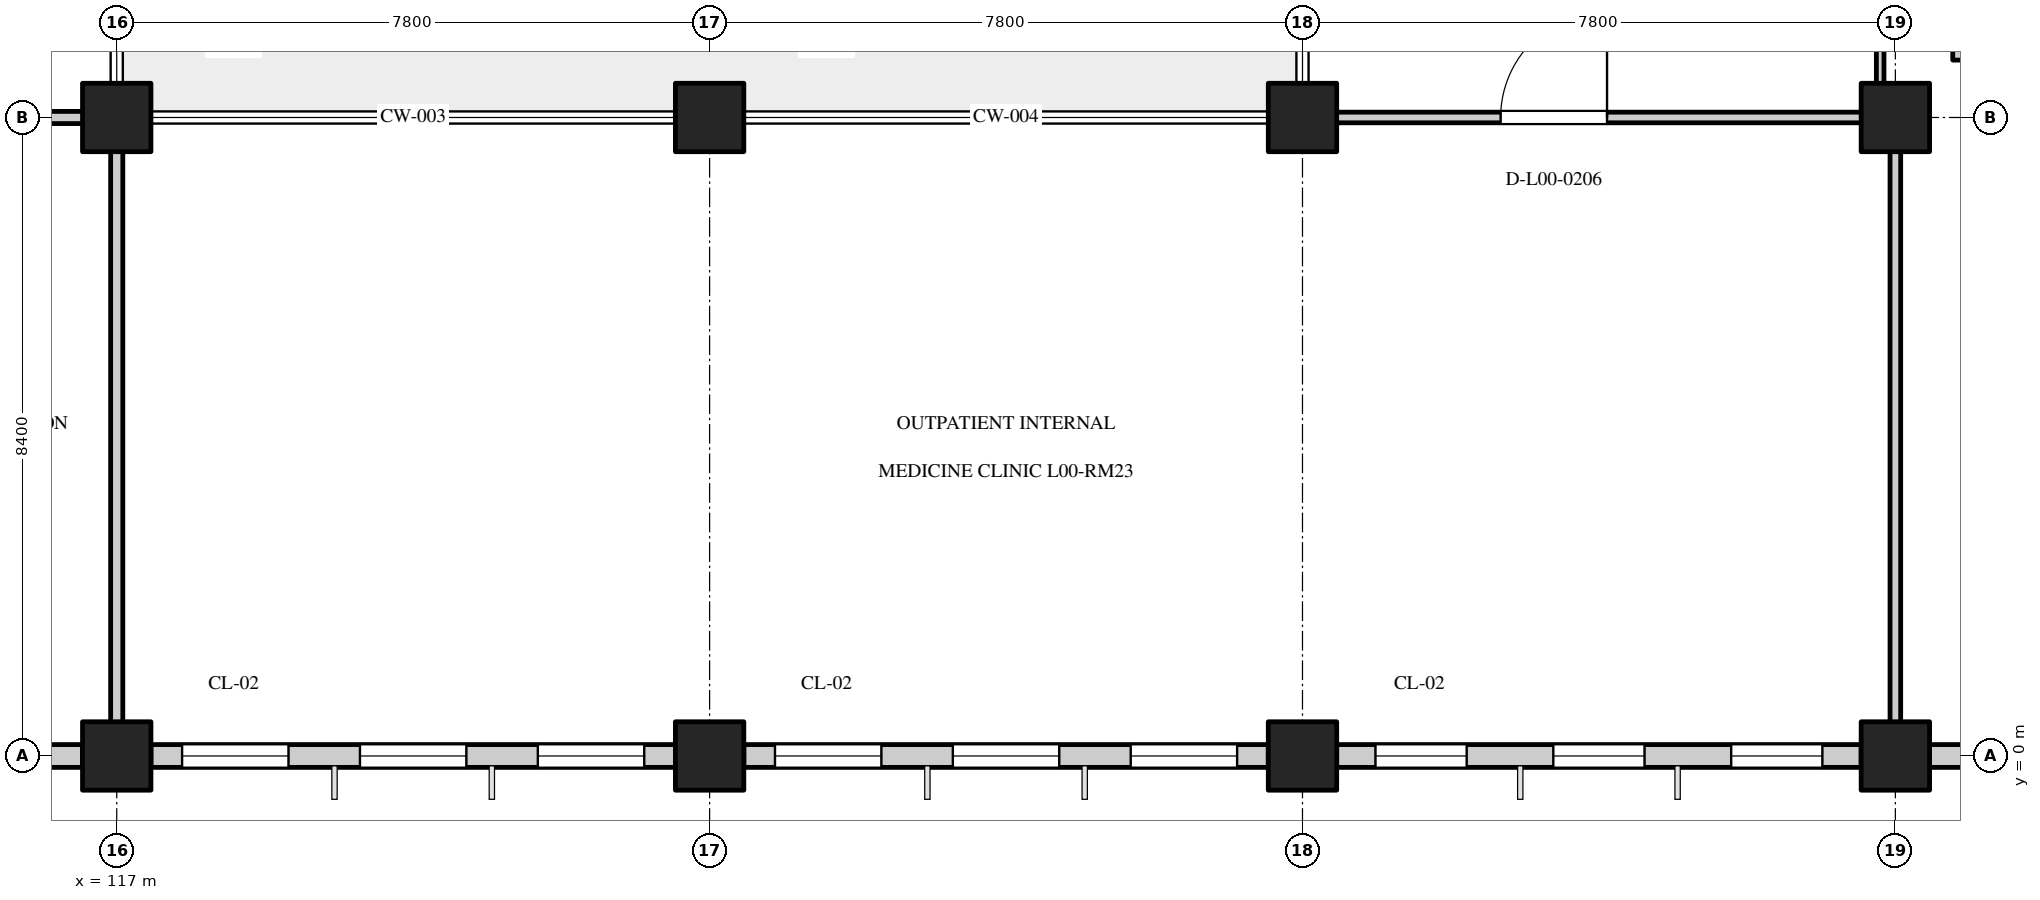
"""IFC4 building model, lengths in metres.
Left out: names, types, materials, properties, quantities, classifications, styles, units other than length and angle.
Written with IfcOpenShell. Run it as: python <this file> out.ifc"""

import sys

from ifc_helpers import new_model, si_unit, direction, frame, frame_2d, origin, origin_2d, place, context, subcontext, project, spatial, rectangle, extrude, element, fill, save


model = new_model("IFC4")
c1 = context("Model", 3, precision=1e-05, world=origin(), true_north=direction((0.0, 1.0)))
c2 = subcontext(c1, "Body", "Model", "MODEL_VIEW")
j1 = project(units=[si_unit("LENGTHUNIT", "METRE"), si_unit("PLANEANGLEUNIT", "RADIAN")], contexts=[c1])
p1 = place(None, origin())
s1 = spatial("IfcSite", under=j1, at=p1, CompositionType="ELEMENT")
p2 = place(p1, origin())
s2 = spatial("IfcBuilding", under=s1, at=p2, CompositionType="ELEMENT")
p3 = place(p2, origin())
s3 = spatial("IfcBuildingStorey", under=s2, at=p3, CompositionType="ELEMENT", Elevation=0.0)
for number, where, z_axis, x_axis in (
    (1, (117.0, 0.0, 0.0), (0.0, 0.0, 1.0), (1.0, 0.0, 0.0)),
    (2, (117.0, 8.4, 0.0), (0.0, 0.0, 1.0), (1.0, 0.0, 0.0)),
    (3, (124.8, 0.0, 0.0), (0.0, 0.0, 1.0), (1.0, 0.0, 0.0)),
    (4, (124.8, 8.4, 0.0), (0.0, 0.0, 1.0), (1.0, 0.0, 0.0)),
    (5, (132.6, 0.0, 0.0), (0.0, 0.0, 1.0), (1.0, 0.0, 0.0)),
    (6, (132.6, 8.4, 0.0), (0.0, 0.0, 1.0), (1.0, 0.0, 0.0)),
    (7, (140.4, 0.0, 0.0), (0.0, 0.0, 1.0), (1.0, 0.0, 0.0)),
    (8, (140.4, 8.4, 0.0), (0.0, 0.0, 1.0), (1.0, 0.0, 0.0)),
):
    element("IfcColumn", number, at=place(p3, frame(where, z_axis=z_axis, x_axis=x_axis)), inside=s3, PredefinedType="COLUMN", context=c2, shape_type="SweptSolid", body=[
        extrude(rectangle(XDim=0.9, YDim=0.9, at=origin_2d()), origin(), (0.0, 0.0, 1.0), 4.8),
    ])
p4 = place(p3, frame((109.65, 0.0, 0.0), z_axis=(0.0, 0.0, 1.0), x_axis=(1.0, 0.0, 0.0)))
e9 = element("IfcWall", 9, at=p4, inside=s3, PredefinedType="STANDARD", context=c2, shape_type="SweptSolid", body=[
    extrude(rectangle(XDim=6.9, YDim=0.3, at=frame_2d((3.45, 0.0))), origin(), (0.0, 0.0, 1.0), 3.75),
])
p5 = place(p4, frame((0.51, 0.0, 0.75)))
e10 = element("IfcOpeningElement", 10, at=p5, cuts=e9, PredefinedType="OPENING", context=c2, shape_type="SweptSolid", body=[
    extrude(rectangle(XDim=1.2, YDim=1.4, at=frame_2d((0.6, 0.7))), frame((0.0, 0.162, 0.0), z_axis=(0.0, -1.0, 0.0), x_axis=(1.0, 0.0, 0.0)), (0.0, 0.0, 1.0), 0.324),
])
p6 = place(p4, frame((2.85, 0.0, 0.75)))
e11 = element("IfcOpeningElement", 11, at=p6, cuts=e9, PredefinedType="OPENING", context=c2, shape_type="SweptSolid", body=[
    extrude(rectangle(XDim=1.2, YDim=1.4, at=frame_2d((0.6, 0.7))), frame((0.0, 0.162, 0.0), z_axis=(0.0, -1.0, 0.0), x_axis=(1.0, 0.0, 0.0)), (0.0, 0.0, 1.0), 0.324),
])
p7 = place(p4, frame((5.19, 0.0, 0.75)))
e12 = element("IfcOpeningElement", 12, at=p7, cuts=e9, PredefinedType="OPENING", context=c2, shape_type="SweptSolid", body=[
    extrude(rectangle(XDim=1.2, YDim=1.4, at=frame_2d((0.6, 0.7))), frame((0.0, 0.162, 0.0), z_axis=(0.0, -1.0, 0.0), x_axis=(1.0, 0.0, 0.0)), (0.0, 0.0, 1.0), 0.324),
])
p8 = place(p3, frame((117.45, 0.0, 0.0), z_axis=(0.0, 0.0, 1.0), x_axis=(1.0, 0.0, 0.0)))
e13 = element("IfcWall", 13, at=p8, inside=s3, PredefinedType="STANDARD", context=c2, shape_type="SweptSolid", body=[
    extrude(rectangle(XDim=6.9, YDim=0.3, at=frame_2d((3.45, 0.0))), origin(), (0.0, 0.0, 1.0), 3.75),
])
p9 = place(p8, frame((0.41, 0.0, 0.75)))
e14 = element("IfcOpeningElement", 14, at=p9, cuts=e13, PredefinedType="OPENING", context=c2, shape_type="SweptSolid", body=[
    extrude(rectangle(XDim=1.4, YDim=1.6, at=frame_2d((0.7, 0.8))), frame((0.0, 0.162, 0.0), z_axis=(0.0, -1.0, 0.0), x_axis=(1.0, 0.0, 0.0)), (0.0, 0.0, 1.0), 0.324),
])
p10 = place(p8, frame((2.75, 0.0, 0.75)))
e15 = element("IfcOpeningElement", 15, at=p10, cuts=e13, PredefinedType="OPENING", context=c2, shape_type="SweptSolid", body=[
    extrude(rectangle(XDim=1.4, YDim=1.6, at=frame_2d((0.7, 0.8))), frame((0.0, 0.162, 0.0), z_axis=(0.0, -1.0, 0.0), x_axis=(1.0, 0.0, 0.0)), (0.0, 0.0, 1.0), 0.324),
])
p11 = place(p8, frame((5.09, 0.0, 0.75)))
e16 = element("IfcOpeningElement", 16, at=p11, cuts=e13, PredefinedType="OPENING", context=c2, shape_type="SweptSolid", body=[
    extrude(rectangle(XDim=1.4, YDim=1.6, at=frame_2d((0.7, 0.8))), frame((0.0, 0.162, 0.0), z_axis=(0.0, -1.0, 0.0), x_axis=(1.0, 0.0, 0.0)), (0.0, 0.0, 1.0), 0.324),
])
p12 = place(p3, frame((125.25, 0.0, 0.0), z_axis=(0.0, 0.0, 1.0), x_axis=(1.0, 0.0, 0.0)))
e17 = element("IfcWall", 17, at=p12, inside=s3, PredefinedType="STANDARD", context=c2, shape_type="SweptSolid", body=[
    extrude(rectangle(XDim=6.9, YDim=0.3, at=frame_2d((3.45, 0.0))), origin(), (0.0, 0.0, 1.0), 3.75),
])
p13 = place(p12, frame((0.41, 0.0, 0.75)))
e18 = element("IfcOpeningElement", 18, at=p13, cuts=e17, PredefinedType="OPENING", context=c2, shape_type="SweptSolid", body=[
    extrude(rectangle(XDim=1.4, YDim=1.45, at=frame_2d((0.7, 0.725))), frame((0.0, 0.162, 0.0), z_axis=(0.0, -1.0, 0.0), x_axis=(1.0, 0.0, 0.0)), (0.0, 0.0, 1.0), 0.324),
])
p14 = place(p12, frame((2.75, 0.0, 0.75)))
e19 = element("IfcOpeningElement", 19, at=p14, cuts=e17, PredefinedType="OPENING", context=c2, shape_type="SweptSolid", body=[
    extrude(rectangle(XDim=1.4, YDim=1.45, at=frame_2d((0.7, 0.725))), frame((0.0, 0.162, 0.0), z_axis=(0.0, -1.0, 0.0), x_axis=(1.0, 0.0, 0.0)), (0.0, 0.0, 1.0), 0.324),
])
p15 = place(p12, frame((5.09, 0.0, 0.75)))
e20 = element("IfcOpeningElement", 20, at=p15, cuts=e17, PredefinedType="OPENING", context=c2, shape_type="SweptSolid", body=[
    extrude(rectangle(XDim=1.4, YDim=1.45, at=frame_2d((0.7, 0.725))), frame((0.0, 0.162, 0.0), z_axis=(0.0, -1.0, 0.0), x_axis=(1.0, 0.0, 0.0)), (0.0, 0.0, 1.0), 0.324),
])
p16 = place(p3, frame((133.05, 0.0, 0.0), z_axis=(0.0, 0.0, 1.0), x_axis=(1.0, 0.0, 0.0)))
e21 = element("IfcWall", 21, at=p16, inside=s3, PredefinedType="STANDARD", context=c2, shape_type="SweptSolid", body=[
    extrude(rectangle(XDim=6.9, YDim=0.3, at=frame_2d((3.45, 0.0))), origin(), (0.0, 0.0, 1.0), 3.75),
])
p17 = place(p16, frame((0.51, 0.0, 0.75)))
e22 = element("IfcOpeningElement", 22, at=p17, cuts=e21, PredefinedType="OPENING", context=c2, shape_type="SweptSolid", body=[
    extrude(rectangle(XDim=1.2, YDim=1.55, at=frame_2d((0.6, 0.775))), frame((0.0, 0.162, 0.0), z_axis=(0.0, -1.0, 0.0), x_axis=(1.0, 0.0, 0.0)), (0.0, 0.0, 1.0), 0.324),
])
p18 = place(p16, frame((2.85, 0.0, 0.75)))
e23 = element("IfcOpeningElement", 23, at=p18, cuts=e21, PredefinedType="OPENING", context=c2, shape_type="SweptSolid", body=[
    extrude(rectangle(XDim=1.2, YDim=1.55, at=frame_2d((0.6, 0.775))), frame((0.0, 0.162, 0.0), z_axis=(0.0, -1.0, 0.0), x_axis=(1.0, 0.0, 0.0)), (0.0, 0.0, 1.0), 0.324),
])
p19 = place(p16, frame((5.19, 0.0, 0.75)))
e24 = element("IfcOpeningElement", 24, at=p19, cuts=e21, PredefinedType="OPENING", context=c2, shape_type="SweptSolid", body=[
    extrude(rectangle(XDim=1.2, YDim=1.55, at=frame_2d((0.6, 0.775))), frame((0.0, 0.162, 0.0), z_axis=(0.0, -1.0, 0.0), x_axis=(1.0, 0.0, 0.0)), (0.0, 0.0, 1.0), 0.324),
])
p20 = place(p3, frame((140.85, 0.0, 0.0), z_axis=(0.0, 0.0, 1.0), x_axis=(1.0, 0.0, 0.0)))
e25 = element("IfcWall", 25, at=p20, inside=s3, PredefinedType="STANDARD", context=c2, shape_type="SweptSolid", body=[
    extrude(rectangle(XDim=6.9, YDim=0.3, at=frame_2d((3.45, 0.0))), origin(), (0.0, 0.0, 1.0), 3.75),
])
p21 = place(p20, frame((2.55, 0.0, 0.0)))
e26 = element("IfcOpeningElement", 26, at=p21, cuts=e25, PredefinedType="OPENING", context=c2, shape_type="SweptSolid", body=[
    extrude(rectangle(XDim=1.8, YDim=2.2, at=frame_2d((0.9, 1.1))), frame((0.0, 0.162, 0.0), z_axis=(0.0, -1.0, 0.0), x_axis=(1.0, 0.0, 0.0)), (0.0, 0.0, 1.0), 0.324),
])
p22 = place(p3, frame((141.275, 9.155, 0.0), z_axis=(0.0, 0.0, 1.0), x_axis=(0.0, 1.0, 0.0)))
e27 = element("IfcWall", 27, at=p22, inside=s3, PredefinedType="STANDARD", context=c2, shape_type="SweptSolid", body=[
    extrude(rectangle(XDim=2.695, YDim=0.24, at=frame_2d((1.348, 0.0))), origin(), (0.0, 0.0, 1.0), 4.45),
])
p23 = place(p3, frame((101.485, 8.4, 0.0), z_axis=(0.0, 0.0, 1.0), x_axis=(1.0, 0.0, 0.0)))
e28 = element("IfcWall", 28, at=p23, inside=s3, PredefinedType="PARTITIONING", context=c2, shape_type="SweptSolid", body=[
    extrude(rectangle(XDim=15.43, YDim=0.16, at=frame_2d((7.715, 0.0))), origin(), (0.0, 0.0, 1.0), 4.43),
])
p24 = place(p23, frame((2.301, 0.0, 0.0)))
e29 = element("IfcOpeningElement", 29, at=p24, cuts=e28, PredefinedType="OPENING", context=c2, shape_type="SweptSolid", body=[
    extrude(rectangle(XDim=1.6, YDim=2.25, at=frame_2d((0.8, 1.125))), frame((0.0, 0.092, 0.0), z_axis=(0.0, -1.0, 0.0), x_axis=(1.0, 0.0, 0.0)), (0.0, 0.0, 1.0), 0.184),
])
p25 = place(p3, frame((117.0, 0.085, 0.0), z_axis=(0.0, 0.0, 1.0), x_axis=(0.0, 1.0, 0.0)))
e30 = element("IfcWall", 30, at=p25, inside=s3, PredefinedType="PARTITIONING", context=c2, shape_type="SweptSolid", body=[
    extrude(rectangle(XDim=8.23, YDim=0.16, at=frame_2d((4.115, 0.0))), origin(), (0.0, 0.0, 1.0), 3.7),
])
p26 = place(p3, frame((124.39, 8.4, 0.0), z_axis=(0.0, 0.0, 1.0), x_axis=(1.0, 0.0, 0.0)))
e31 = element("IfcWall", 31, at=p26, inside=s3, PredefinedType="PARTITIONING", context=c2, shape_type="SweptSolid", body=[
    extrude(rectangle(XDim=0.82, YDim=0.14, at=frame_2d((0.41, 0.0))), origin(), (0.0, 0.0, 1.0), 4.43),
])
p27 = place(p3, frame((132.19, 8.4, 0.0), z_axis=(0.0, 0.0, 1.0), x_axis=(1.0, 0.0, 0.0)))
e32 = element("IfcWall", 32, at=p27, inside=s3, PredefinedType="PARTITIONING", context=c2, shape_type="SweptSolid", body=[
    extrude(rectangle(XDim=8.125, YDim=0.14, at=frame_2d((4.062, 0.0))), origin(), (0.0, 0.0, 1.0), 4.43),
])
p28 = place(p27, frame((3.017, 0.0, 0.0)))
e33 = element("IfcOpeningElement", 33, at=p28, cuts=e32, PredefinedType="OPENING", context=c2, shape_type="SweptSolid", body=[
    extrude(rectangle(XDim=1.4, YDim=2.25, at=frame_2d((0.7, 1.125))), frame((0.0, 0.082, 0.0), z_axis=(0.0, -1.0, 0.0), x_axis=(1.0, 0.0, 0.0)), (0.0, 0.0, 1.0), 0.164),
])
for number, where, z_axis, x_axis in (
    (34, (124.39, 0.0, 0.0), (0.0, 0.0, 1.0), (1.0, 0.0, 0.0)),
    (35, (132.19, 0.0, 0.0), (0.0, 0.0, 1.0), (1.0, 0.0, 0.0)),
):
    element("IfcWall", number, at=place(p3, frame(where, z_axis=z_axis, x_axis=x_axis)), inside=s3, PredefinedType="PARTITIONING", context=c2, shape_type="SweptSolid", body=[
        extrude(rectangle(XDim=0.82, YDim=0.14, at=frame_2d((0.41, 0.0))), origin(), (0.0, 0.0, 1.0), 3.7),
    ])
p29 = place(p3, frame((140.4, 0.085, 0.0), z_axis=(0.0, 0.0, 1.0), x_axis=(0.0, 1.0, 0.0)))
e36 = element("IfcWall", 36, at=p29, inside=s3, PredefinedType="PARTITIONING", context=c2, shape_type="SweptSolid", body=[
    extrude(rectangle(XDim=8.23, YDim=0.14, at=frame_2d((4.115, 0.0))), origin(), (0.0, 0.0, 1.0), 4.43),
])
p30 = place(p3, frame((140.2, 8.485, 0.0), z_axis=(0.0, 0.0, 1.0), x_axis=(0.0, 1.0, 0.0)))
e37 = element("IfcWall", 37, at=p30, inside=s3, PredefinedType="PARTITIONING", context=c2, shape_type="SweptSolid", body=[
    extrude(rectangle(XDim=16.63, YDim=0.1, at=frame_2d((8.315, 0.0))), origin(), (0.0, 0.0, 1.0), 4.43),
])
p31 = place(p9, origin())
e38 = element("IfcWindow", 38, at=p31, inside=s3, PartitioningType="SINGLE_PANEL", PredefinedType="WINDOW", context=c2, shape_type="SweptSolid", body=[
    extrude(rectangle(XDim=1.4, YDim=1.6, at=frame_2d((0.7, 0.8))), frame((0.0, 0.03, 0.0), z_axis=(0.0, -1.0, 0.0), x_axis=(1.0, 0.0, 0.0)), (0.0, 0.0, 1.0), 0.06),
])
fill(e14, e38)
p32 = place(p10, origin())
e39 = element("IfcWindow", 39, at=p32, inside=s3, PartitioningType="SINGLE_PANEL", PredefinedType="WINDOW", context=c2, shape_type="SweptSolid", body=[
    extrude(rectangle(XDim=1.4, YDim=1.6, at=frame_2d((0.7, 0.8))), frame((0.0, 0.03, 0.0), z_axis=(0.0, -1.0, 0.0), x_axis=(1.0, 0.0, 0.0)), (0.0, 0.0, 1.0), 0.06),
])
fill(e15, e39)
p33 = place(p11, origin())
e40 = element("IfcWindow", 40, at=p33, inside=s3, PartitioningType="SINGLE_PANEL", PredefinedType="WINDOW", context=c2, shape_type="SweptSolid", body=[
    extrude(rectangle(XDim=1.4, YDim=1.6, at=frame_2d((0.7, 0.8))), frame((0.0, 0.03, 0.0), z_axis=(0.0, -1.0, 0.0), x_axis=(1.0, 0.0, 0.0)), (0.0, 0.0, 1.0), 0.06),
])
fill(e16, e40)
p34 = place(p13, origin())
e41 = element("IfcWindow", 41, at=p34, inside=s3, PartitioningType="SINGLE_PANEL", PredefinedType="WINDOW", context=c2, shape_type="SweptSolid", body=[
    extrude(rectangle(XDim=1.4, YDim=1.45, at=frame_2d((0.7, 0.725))), frame((0.0, 0.03, 0.0), z_axis=(0.0, -1.0, 0.0), x_axis=(1.0, 0.0, 0.0)), (0.0, 0.0, 1.0), 0.06),
])
fill(e18, e41)
p35 = place(p14, origin())
e42 = element("IfcWindow", 42, at=p35, inside=s3, PartitioningType="SINGLE_PANEL", PredefinedType="WINDOW", context=c2, shape_type="SweptSolid", body=[
    extrude(rectangle(XDim=1.4, YDim=1.45, at=frame_2d((0.7, 0.725))), frame((0.0, 0.03, 0.0), z_axis=(0.0, -1.0, 0.0), x_axis=(1.0, 0.0, 0.0)), (0.0, 0.0, 1.0), 0.06),
])
fill(e19, e42)
p36 = place(p15, origin())
e43 = element("IfcWindow", 43, at=p36, inside=s3, PartitioningType="SINGLE_PANEL", PredefinedType="WINDOW", context=c2, shape_type="SweptSolid", body=[
    extrude(rectangle(XDim=1.4, YDim=1.45, at=frame_2d((0.7, 0.725))), frame((0.0, 0.03, 0.0), z_axis=(0.0, -1.0, 0.0), x_axis=(1.0, 0.0, 0.0)), (0.0, 0.0, 1.0), 0.06),
])
fill(e20, e43)
p37 = place(p17, origin())
e44 = element("IfcWindow", 44, at=p37, inside=s3, PartitioningType="SINGLE_PANEL", PredefinedType="WINDOW", context=c2, shape_type="SweptSolid", body=[
    extrude(rectangle(XDim=1.2, YDim=1.55, at=frame_2d((0.6, 0.775))), frame((0.0, 0.03, 0.0), z_axis=(0.0, -1.0, 0.0), x_axis=(1.0, 0.0, 0.0)), (0.0, 0.0, 1.0), 0.06),
])
fill(e22, e44)
p38 = place(p18, origin())
e45 = element("IfcWindow", 45, at=p38, inside=s3, PartitioningType="SINGLE_PANEL", PredefinedType="WINDOW", context=c2, shape_type="SweptSolid", body=[
    extrude(rectangle(XDim=1.2, YDim=1.55, at=frame_2d((0.6, 0.775))), frame((0.0, 0.03, 0.0), z_axis=(0.0, -1.0, 0.0), x_axis=(1.0, 0.0, 0.0)), (0.0, 0.0, 1.0), 0.06),
])
fill(e23, e45)
p39 = place(p19, origin())
e46 = element("IfcWindow", 46, at=p39, inside=s3, PartitioningType="SINGLE_PANEL", PredefinedType="WINDOW", context=c2, shape_type="SweptSolid", body=[
    extrude(rectangle(XDim=1.2, YDim=1.55, at=frame_2d((0.6, 0.775))), frame((0.0, 0.03, 0.0), z_axis=(0.0, -1.0, 0.0), x_axis=(1.0, 0.0, 0.0)), (0.0, 0.0, 1.0), 0.06),
])
fill(e24, e46)
p40 = place(p28, frame((1.4, 0.0, 0.0), z_axis=(0.0, 0.0, 1.0), x_axis=(-1.0, 0.0, 0.0)))
e47 = element("IfcDoor", 47, at=p40, inside=s3, OperationType="SINGLE_SWING_LEFT", PredefinedType="DOOR", context=c2, shape_type="SweptSolid", body=[
    extrude(rectangle(XDim=1.4, YDim=2.25, at=frame_2d((0.7, 1.125))), frame((0.0, 0.025, 0.0), z_axis=(0.0, -1.0, 0.0), x_axis=(1.0, 0.0, 0.0)), (0.0, 0.0, 1.0), 0.05),
])
fill(e33, e47)
save(model, sys.argv[1])
